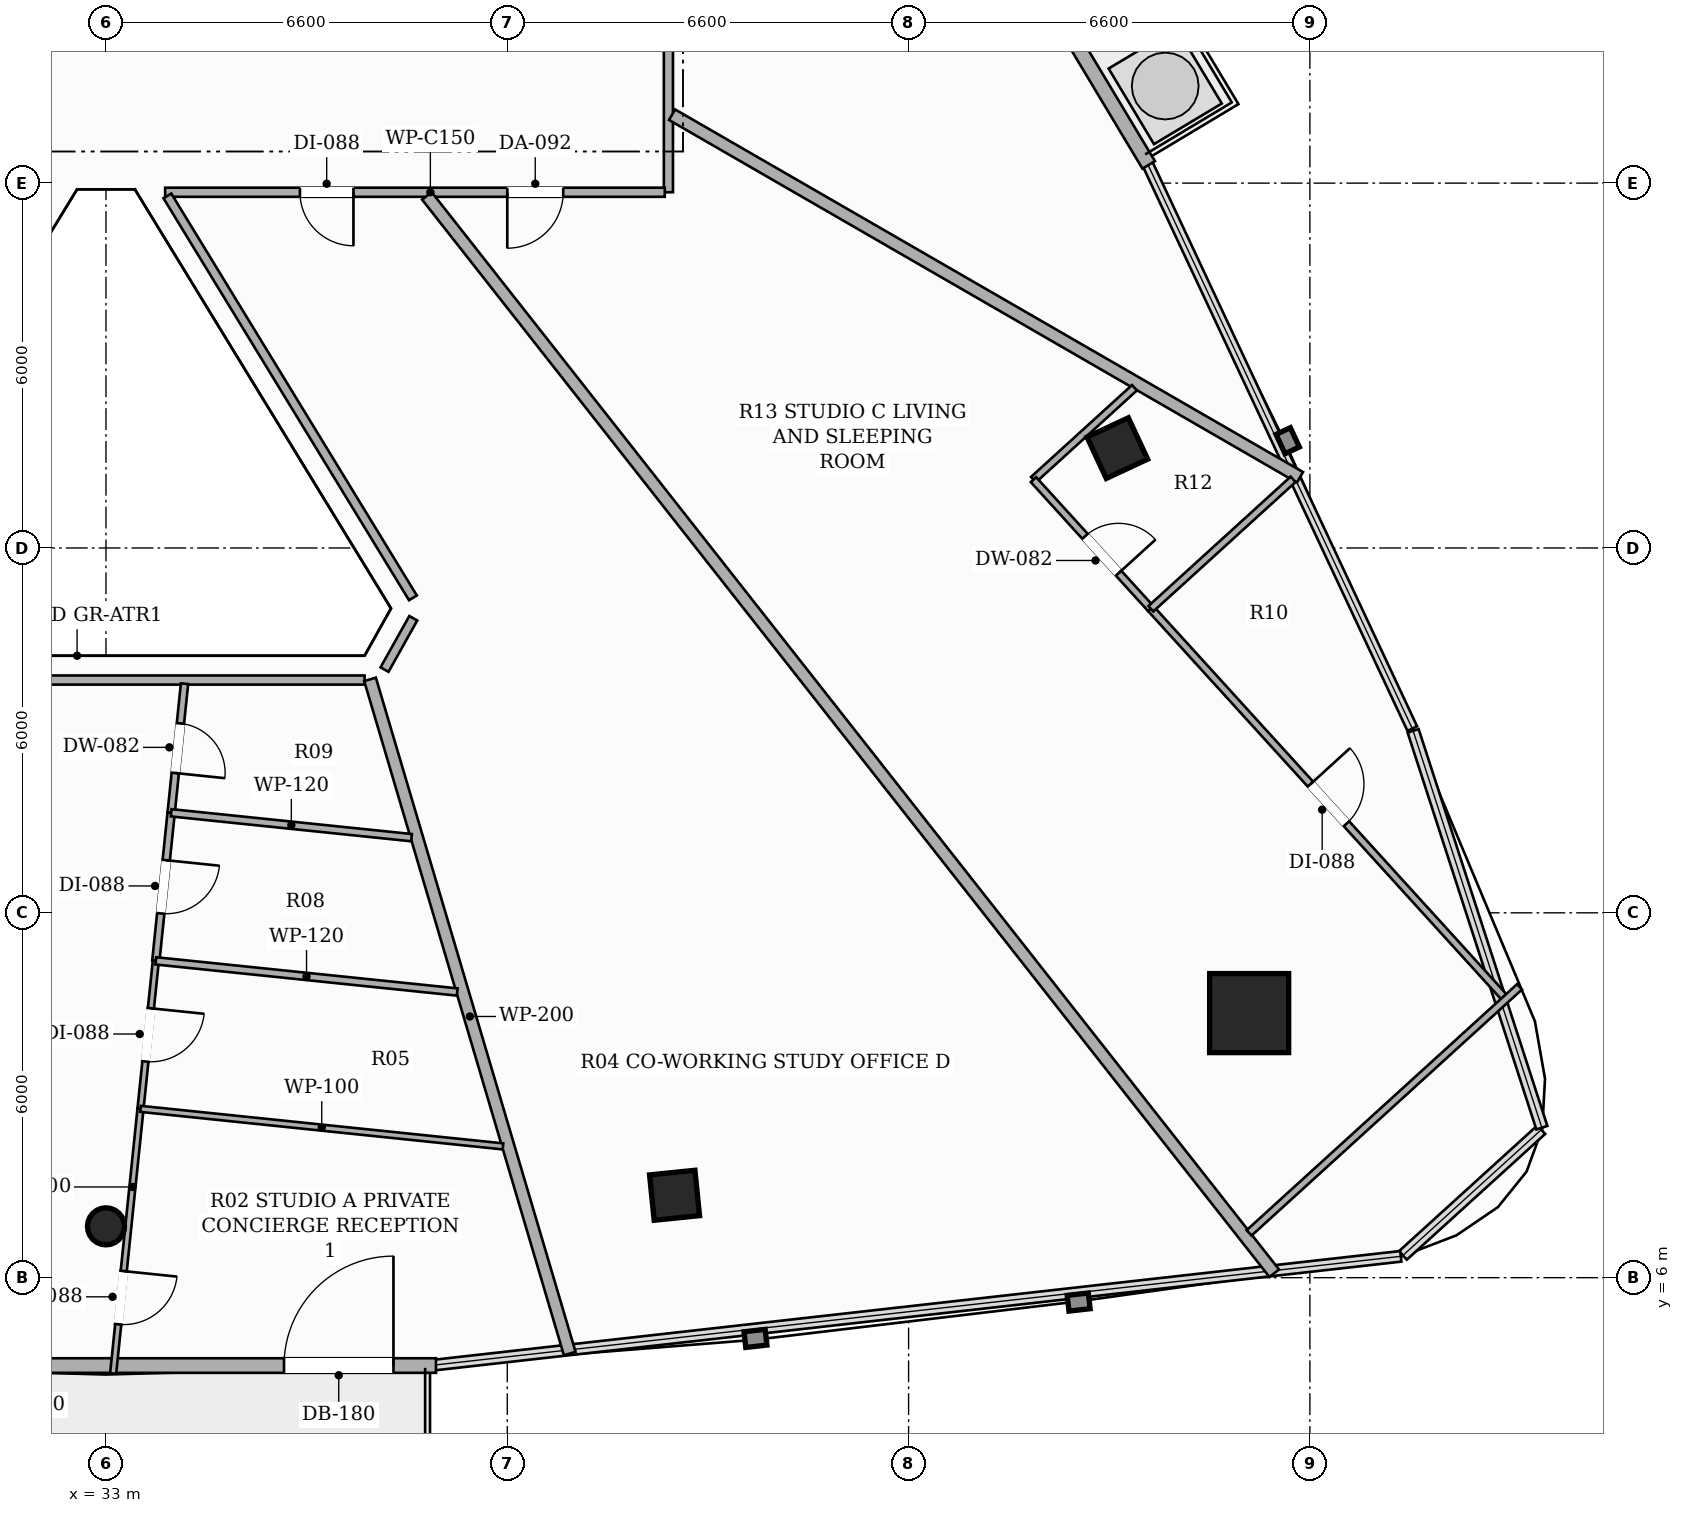
"""IFC4 building model, lengths in metres.
Left out: names, types, materials, properties, quantities, classifications, styles, units other than length and angle.
Written with IfcOpenShell. Run it as: python <this file> out.ifc"""

import sys

from ifc_helpers import new_model, si_unit, direction, frame, frame_2d, origin, origin_2d, place, context, subcontext, project, spatial, rectangle, hollow_rectangle, hollow_circle, extrude, element, fill, save


model = new_model("IFC4")
c1 = context("Model", 3, precision=1e-05, world=origin(), true_north=direction((0.0, 1.0)))
c2 = subcontext(c1, "Body", "Model", "MODEL_VIEW")
j1 = project(units=[si_unit("LENGTHUNIT", "METRE"), si_unit("PLANEANGLEUNIT", "RADIAN")], contexts=[c1])
p1 = place(None, origin())
s1 = spatial("IfcSite", under=j1, at=p1, CompositionType="ELEMENT")
p2 = place(p1, origin())
s2 = spatial("IfcBuilding", under=s1, at=p2, CompositionType="ELEMENT")
p3 = place(p2, frame((0.0, 0.0, 196.4)))
s3 = spatial("IfcBuildingStorey", under=s2, at=p3, CompositionType="ELEMENT", Elevation=196.4)
p4 = place(p3, frame((51.801, 10.351, 0.0), z_axis=(0.0, 0.0, 1.0), x_axis=(1.0, 0.0, 0.0)))
e1 = element("IfcColumn", 1, at=p4, inside=s3, PredefinedType="COLUMN", context=c2, shape_type="SweptSolid", body=[
    extrude(hollow_rectangle(XDim=1.3, YDim=1.3, WallThickness=0.04, at=origin_2d()), origin(), (0.0, 0.0, 1.0), 3.3),
])
p5 = place(p3, frame((33.0, 6.844, 0.0), z_axis=(0.0, 0.0, 1.0), x_axis=(1.0, 0.0, 0.0)))
e2 = element("IfcColumn", 2, at=p5, inside=s3, PredefinedType="COLUMN", context=c2, shape_type="SweptSolid", body=[
    extrude(hollow_circle(Radius=0.305, WallThickness=0.016, at=origin_2d()), origin(), (0.0, 0.0, 1.0), 3.3),
])
for number, where, z_axis, x_axis in (
    (3, (42.351, 7.355, 0.0), (0.0, 0.0, 1.0), (0.995, 0.101, 0.0)),
    (4, (49.633, 19.642, 0.0), (0.0, 0.0, 1.0), (-0.423, 0.906, 0.0)),
):
    element("IfcColumn", number, at=place(p3, frame(where, z_axis=z_axis, x_axis=x_axis)), inside=s3, PredefinedType="COLUMN", context=c2, shape_type="SweptSolid", body=[
        extrude(hollow_rectangle(XDim=0.75, YDim=0.75, WallThickness=0.025, at=origin_2d()), origin(), (0.0, 0.0, 1.0), 3.3),
    ])
p6 = place(p3, frame((27.573, 4.555, 0.0), z_axis=(0.0, 0.0, 1.0), x_axis=(1.0, 0.0, 0.0)))
e5 = element("IfcWall", 5, at=p6, inside=s3, PredefinedType="SOLIDWALL", context=c2, shape_type="SweptSolid", body=[
    extrude(rectangle(XDim=10.854, YDim=0.24, at=frame_2d((5.427, 0.0))), origin(), (0.0, 0.0, 1.0), 2.624),
])
p7 = place(p6, frame((8.355, 0.0, 0.0)))
e6 = element("IfcOpeningElement", 6, at=p7, cuts=e5, PredefinedType="OPENING", context=c2, shape_type="SweptSolid", body=[
    extrude(rectangle(XDim=1.8, YDim=2.2, at=frame_2d((0.9, 1.1))), frame((0.0, 0.13, 0.0), z_axis=(0.0, -1.0, 0.0), x_axis=(1.0, 0.0, 0.0)), (0.0, 0.0, 1.0), 0.26),
])
p8 = place(p3, frame((50.149, 24.3, 0.0), z_axis=(0.0, 0.0, 1.0), x_axis=(-0.514406779101, 0.857546305231, 0.0)))
e7 = element("IfcWall", 7, at=p8, inside=s3, PredefinedType="SOLIDWALL", context=c2, shape_type="SweptSolid", body=[
    extrude(rectangle(XDim=10.492, YDim=0.24, at=frame_2d((5.246, 0.0))), origin(), (0.0, 0.0, 1.0), 2.624),
])
p9 = place(p8, frame((7.994, 0.0, 0.0)))
e8 = element("IfcOpeningElement", 8, at=p9, cuts=e7, PredefinedType="OPENING", context=c2, shape_type="SweptSolid", body=[
    extrude(rectangle(XDim=1.8, YDim=2.2, at=frame_2d((0.9, 1.1))), frame((0.0, 0.13, 0.0), z_axis=(0.0, -1.0, 0.0), x_axis=(1.0, 0.0, 0.0)), (0.0, 0.0, 1.0), 0.26),
])
p10 = place(p3, frame((42.25, 26.59, 0.0), z_axis=(0.0, 0.0, 1.0), x_axis=(0.0, -1.0, 0.0)))
e9 = element("IfcWall", 9, at=p10, inside=s3, PredefinedType="PARTITIONING", context=c2, shape_type="SweptSolid", body=[
    extrude(rectangle(XDim=2.74, YDim=0.15, at=frame_2d((1.37, 0.0))), origin(), (0.0, 0.0, 1.0), 2.773),
])
p11 = place(p3, frame((42.19, 23.85, 0.0), z_axis=(0.0, 0.0, 1.0), x_axis=(-1.0, 0.0, 0.0)))
e10 = element("IfcWall", 10, at=p11, inside=s3, PredefinedType="PARTITIONING", context=c2, shape_type="SweptSolid", body=[
    extrude(rectangle(XDim=8.217, YDim=0.15, at=frame_2d((4.108, 0.0))), origin(), (0.0, 0.0, 1.0), 2.565),
])
p12 = place(p11, frame((1.67, 0.0, 0.0)))
e11 = element("IfcOpeningElement", 11, at=p12, cuts=e10, PredefinedType="OPENING", context=c2, shape_type="SweptSolid", body=[
    extrude(rectangle(XDim=0.92, YDim=2.15, at=frame_2d((0.46, 1.075))), frame((0.0, 0.085, 0.0), z_axis=(0.0, -1.0, 0.0), x_axis=(1.0, 0.0, 0.0)), (0.0, 0.0, 1.0), 0.17),
])
p13 = place(p11, frame((5.12, 0.0, 0.0)))
e12 = element("IfcOpeningElement", 12, at=p13, cuts=e10, PredefinedType="OPENING", context=c2, shape_type="SweptSolid", body=[
    extrude(rectangle(XDim=0.88, YDim=2.1, at=frame_2d((0.44, 1.05))), frame((0.0, 0.085, 0.0), z_axis=(0.0, -1.0, 0.0), x_axis=(1.0, 0.0, 0.0)), (0.0, 0.0, 1.0), 0.17),
])
p14 = place(p3, frame((34.01, 23.79, 0.0), z_axis=(0.0, 0.0, 1.0), x_axis=(0.521316137909, -0.853363629618, 0.0)))
e13 = element("IfcWall", 13, at=p14, inside=s3, PredefinedType="PARTITIONING", context=c2, shape_type="SweptSolid", body=[
    extrude(rectangle(XDim=7.746, YDim=0.15, at=frame_2d((3.873, 0.0))), origin(), (0.0, 0.0, 1.0), 2.773),
])
p15 = place(p3, frame((38.054, 16.844, 0.0), z_axis=(0.0, 0.0, 1.0), x_axis=(-0.488810833005, -0.872389803664, 0.0)))
e14 = element("IfcWall", 14, at=p15, inside=s3, PredefinedType="PARTITIONING", context=c2, shape_type="SweptSolid", body=[
    extrude(rectangle(XDim=0.968, YDim=0.15, at=frame_2d((0.484, 0.0))), origin(), (0.0, 0.0, 1.0), 3.06),
])
p16 = place(p3, frame((37.253, 15.828, 0.0), z_axis=(0.0, 0.0, 1.0), x_axis=(-1.0, 0.0, 0.0)))
e15 = element("IfcWall", 15, at=p16, inside=s3, PredefinedType="PARTITIONING", context=c2, shape_type="SweptSolid", body=[
    extrude(rectangle(XDim=8.506, YDim=0.15, at=frame_2d((4.253, 0.0))), origin(), (0.0, 0.0, 1.0), 2.773),
])
p17 = place(p3, frame((37.343, 15.839, 0.0), z_axis=(0.0, 0.0, 1.0), x_axis=(0.28399703203, -0.958825159139, 0.0)))
e16 = element("IfcWall", 16, at=p17, inside=s3, PredefinedType="PARTITIONING", context=c2, shape_type="SweptSolid", body=[
    extrude(rectangle(XDim=11.563, YDim=0.2, at=frame_2d((5.782, 0.0))), origin(), (0.0, 0.0, 1.0), 2.492),
])
p18 = place(p3, frame((52.214, 6.073, 0.0), z_axis=(0.0, 0.0, 1.0), x_axis=(-0.618246700658, 0.785984107425, 0.0)))
e17 = element("IfcWall", 17, at=p18, inside=s3, PredefinedType="PARTITIONING", context=c2, shape_type="SweptSolid", body=[
    extrude(rectangle(XDim=22.541, YDim=0.2, at=frame_2d((11.271, 0.0))), origin(), (0.0, 0.0, 1.0), 2.492),
])
p19 = place(p3, frame((42.31, 25.125, 0.0), z_axis=(0.0, 0.0, 1.0), x_axis=(0.866001812803, -0.500040858552, 0.0)))
e18 = element("IfcWall", 18, at=p19, inside=s3, PredefinedType="PARTITIONING", context=c2, shape_type="SweptSolid", body=[
    extrude(rectangle(XDim=11.925, YDim=0.2, at=frame_2d((5.962, 0.0))), origin(), (0.0, 0.0, 1.0), 2.492),
])
p20 = place(p3, frame((34.292, 15.768, 0.0), z_axis=(0.0, 0.0, 1.0), x_axis=(-0.103059151492, -0.994675229054, 0.0)))
e19 = element("IfcWall", 19, at=p20, inside=s3, PredefinedType="PARTITIONING", context=c2, shape_type="SweptSolid", body=[
    extrude(rectangle(XDim=2.135, YDim=0.12, at=frame_2d((1.067, 0.0))), origin(), (0.0, 0.0, 1.0), 3.06),
])
p21 = place(p20, frame((0.657, 0.0, 0.0)))
e20 = element("IfcOpeningElement", 20, at=p21, cuts=e19, PredefinedType="OPENING", context=c2, shape_type="SweptSolid", body=[
    extrude(rectangle(XDim=0.82, YDim=2.1, at=frame_2d((0.41, 1.05))), frame((0.0, 0.07, 0.0), z_axis=(0.0, -1.0, 0.0), x_axis=(1.0, 0.0, 0.0)), (0.0, 0.0, 1.0), 0.14),
])
p22 = place(p3, frame((34.072, 13.645, 0.0), z_axis=(0.0, 0.0, 1.0), x_axis=(-0.102919566026, -0.994689681724, 0.0)))
e21 = element("IfcWall", 21, at=p22, inside=s3, PredefinedType="PARTITIONING", context=c2, shape_type="SweptSolid", body=[
    extrude(rectangle(XDim=2.448, YDim=0.12, at=frame_2d((1.224, 0.0))), origin(), (0.0, 0.0, 1.0), 3.06),
])
p23 = place(p22, frame((0.784, 0.0, 0.0)))
e22 = element("IfcOpeningElement", 22, at=p23, cuts=e21, PredefinedType="OPENING", context=c2, shape_type="SweptSolid", body=[
    extrude(rectangle(XDim=0.88, YDim=2.1, at=frame_2d((0.44, 1.05))), frame((0.0, 0.07, 0.0), z_axis=(0.0, -1.0, 0.0), x_axis=(1.0, 0.0, 0.0)), (0.0, 0.0, 1.0), 0.14),
])
p24 = place(p3, frame((33.568, 8.776, 0.0), z_axis=(0.0, 0.0, 1.0), x_axis=(-0.1029239069, -0.994689232569, 0.0)))
e23 = element("IfcWall", 23, at=p24, inside=s3, PredefinedType="PARTITIONING", context=c2, shape_type="SweptSolid", body=[
    extrude(rectangle(XDim=4.374, YDim=0.1, at=frame_2d((2.187, 0.0))), origin(), (0.0, 0.0, 1.0), 2.492),
])
p25 = place(p24, frame((2.682, 0.0, 0.0)))
e24 = element("IfcOpeningElement", 24, at=p25, cuts=e23, PredefinedType="OPENING", context=c2, shape_type="SweptSolid", body=[
    extrude(rectangle(XDim=0.88, YDim=2.1, at=frame_2d((0.44, 1.05))), frame((0.0, 0.06, 0.0), z_axis=(0.0, -1.0, 0.0), x_axis=(1.0, 0.0, 0.0)), (0.0, 0.0, 1.0), 0.12),
])
p26 = place(p3, frame((33.82, 11.21, 0.0), z_axis=(0.0, 0.0, 1.0), x_axis=(-0.102960420087, -0.994685453747, 0.0)))
e25 = element("IfcWall", 25, at=p26, inside=s3, PredefinedType="PARTITIONING", context=c2, shape_type="SweptSolid", body=[
    extrude(rectangle(XDim=2.447, YDim=0.1, at=frame_2d((1.224, 0.0))), origin(), (0.0, 0.0, 1.0), 3.06),
])
p27 = place(p26, frame((0.784, 0.0, 0.0)))
e26 = element("IfcOpeningElement", 26, at=p27, cuts=e25, PredefinedType="OPENING", context=c2, shape_type="SweptSolid", body=[
    extrude(rectangle(XDim=0.88, YDim=2.1, at=frame_2d((0.44, 1.05))), frame((0.0, 0.06, 0.0), z_axis=(0.0, -1.0, 0.0), x_axis=(1.0, 0.0, 0.0)), (0.0, 0.0, 1.0), 0.12),
])
p28 = place(p3, frame((38.025, 13.236, 0.0), z_axis=(0.0, 0.0, 1.0), x_axis=(-0.99469136016, 0.102903343108, 0.0)))
e27 = element("IfcWall", 27, at=p28, inside=s3, PredefinedType="PARTITIONING", context=c2, shape_type="SweptSolid", body=[
    extrude(rectangle(XDim=3.974, YDim=0.12, at=frame_2d((1.987, 0.0))), origin(), (0.0, 0.0, 1.0), 2.773),
])
p29 = place(p3, frame((38.777, 10.698, 0.0), z_axis=(0.0, 0.0, 1.0), x_axis=(-0.994708898019, 0.102733676081, 0.0)))
e28 = element("IfcWall", 28, at=p29, inside=s3, PredefinedType="PARTITIONING", context=c2, shape_type="SweptSolid", body=[
    extrude(rectangle(XDim=4.983, YDim=0.12, at=frame_2d((2.492, 0.0))), origin(), (0.0, 0.0, 1.0), 2.773),
])
p30 = place(p3, frame((33.568, 8.776, 0.0), z_axis=(0.0, 0.0, 1.0), x_axis=(0.994686760155, -0.102947798284, 0.0)))
e29 = element("IfcWall", 29, at=p30, inside=s3, PredefinedType="PARTITIONING", context=c2, shape_type="SweptSolid", body=[
    extrude(rectangle(XDim=5.993, YDim=0.1, at=frame_2d((2.996, 0.0))), origin(), (0.0, 0.0, 1.0), 2.773),
])
p31 = place(p3, frame((49.915, 20.635, 0.0), z_axis=(0.0, 0.0, 1.0), x_axis=(-0.739748179987, -0.672883816276, 0.0)))
e30 = element("IfcWall", 30, at=p31, inside=s3, PredefinedType="PARTITIONING", context=c2, shape_type="SweptSolid", body=[
    extrude(rectangle(XDim=2.246, YDim=0.12, at=frame_2d((1.123, 0.0))), origin(), (0.0, 0.0, 1.0), 2.492),
])
p32 = place(p3, frame((48.254, 19.124, 0.0), z_axis=(0.0, 0.0, 1.0), x_axis=(0.672884473084, -0.739747582546, 0.0)))
e31 = element("IfcWall", 31, at=p32, inside=s3, PredefinedType="PARTITIONING", context=c2, shape_type="SweptSolid", body=[
    extrude(rectangle(XDim=2.87, YDim=0.12, at=frame_2d((1.435, 0.0))), origin(), (0.0, 0.0, 1.0), 2.492),
])
p33 = place(p32, frame((1.26, 0.0, 0.0)))
e32 = element("IfcOpeningElement", 32, at=p33, cuts=e31, PredefinedType="OPENING", context=c2, shape_type="SweptSolid", body=[
    extrude(rectangle(XDim=0.82, YDim=2.1, at=frame_2d((0.41, 1.05))), frame((0.0, 0.07, 0.0), z_axis=(0.0, -1.0, 0.0), x_axis=(1.0, 0.0, 0.0)), (0.0, 0.0, 1.0), 0.14),
])
p34 = place(p3, frame((50.185, 17.001, 0.0), z_axis=(0.0, 0.0, 1.0), x_axis=(0.672902356661, -0.739731315005, 0.0)))
e33 = element("IfcWall", 33, at=p34, inside=s3, PredefinedType="PARTITIONING", context=c2, shape_type="SweptSolid", body=[
    extrude(rectangle(XDim=8.68, YDim=0.12, at=frame_2d((4.34, 0.0))), origin(), (0.0, 0.0, 1.0), 2.492),
])
p35 = place(p34, frame((3.9, 0.0, 0.0)))
e34 = element("IfcOpeningElement", 34, at=p35, cuts=e33, PredefinedType="OPENING", context=c2, shape_type="SweptSolid", body=[
    extrude(rectangle(XDim=0.88, YDim=2.1, at=frame_2d((0.44, 1.05))), frame((0.0, 0.07, 0.0), z_axis=(0.0, -1.0, 0.0), x_axis=(1.0, 0.0, 0.0)), (0.0, 0.0, 1.0), 0.14),
])
p36 = place(p3, frame((56.248, 10.783, 0.0), z_axis=(0.0, 0.0, 1.0), x_axis=(-0.739671804489, -0.672967771624, 0.0)))
e35 = element("IfcWall", 35, at=p36, inside=s3, PredefinedType="PARTITIONING", context=c2, shape_type="SweptSolid", body=[
    extrude(rectangle(XDim=6.013, YDim=0.12, at=frame_2d((3.007, 0.0))), origin(), (0.0, 0.0, 1.0), 3.06),
])
p37 = place(p3, frame((52.524, 19.129, 0.0), z_axis=(0.0, 0.0, 1.0), x_axis=(-0.739674496232, -0.672964813065, 0.0)))
e36 = element("IfcWall", 36, at=p37, inside=s3, PredefinedType="PARTITIONING", context=c2, shape_type="SweptSolid", body=[
    extrude(rectangle(XDim=3.162, YDim=0.12, at=frame_2d((1.581, 0.0))), origin(), (0.0, 0.0, 1.0), 2.492),
])
p38 = place(p7, origin())
e37 = element("IfcDoor", 37, at=p38, inside=s3, OperationType="SINGLE_SWING_RIGHT", PredefinedType="DOOR", context=c2, shape_type="SweptSolid", body=[
    extrude(rectangle(XDim=1.8, YDim=2.2, at=frame_2d((0.9, 1.1))), frame((0.0, 0.025, 0.0), z_axis=(0.0, -1.0, 0.0), x_axis=(1.0, 0.0, 0.0)), (0.0, 0.0, 1.0), 0.05),
])
fill(e6, e37)
p39 = place(p21, origin())
e38 = element("IfcDoor", 38, at=p39, inside=s3, OperationType="SINGLE_SWING_RIGHT", PredefinedType="DOOR", context=c2, shape_type="SweptSolid", body=[
    extrude(rectangle(XDim=0.82, YDim=2.1, at=frame_2d((0.41, 1.05))), frame((0.0, 0.025, 0.0), z_axis=(0.0, -1.0, 0.0), x_axis=(1.0, 0.0, 0.0)), (0.0, 0.0, 1.0), 0.05),
])
fill(e20, e38)
p40 = place(p23, origin())
e39 = element("IfcDoor", 39, at=p40, inside=s3, OperationType="SINGLE_SWING_LEFT", PredefinedType="DOOR", context=c2, shape_type="SweptSolid", body=[
    extrude(rectangle(XDim=0.88, YDim=2.1, at=frame_2d((0.44, 1.05))), frame((0.0, 0.025, 0.0), z_axis=(0.0, -1.0, 0.0), x_axis=(1.0, 0.0, 0.0)), (0.0, 0.0, 1.0), 0.05),
])
fill(e22, e39)
p41 = place(p25, origin())
e40 = element("IfcDoor", 40, at=p41, inside=s3, OperationType="SINGLE_SWING_LEFT", PredefinedType="DOOR", context=c2, shape_type="SweptSolid", body=[
    extrude(rectangle(XDim=0.88, YDim=2.1, at=frame_2d((0.44, 1.05))), frame((0.0, 0.025, 0.0), z_axis=(0.0, -1.0, 0.0), x_axis=(1.0, 0.0, 0.0)), (0.0, 0.0, 1.0), 0.05),
])
fill(e24, e40)
p42 = place(p27, origin())
e41 = element("IfcDoor", 41, at=p42, inside=s3, OperationType="SINGLE_SWING_LEFT", PredefinedType="DOOR", context=c2, shape_type="SweptSolid", body=[
    extrude(rectangle(XDim=0.88, YDim=2.1, at=frame_2d((0.44, 1.05))), frame((0.0, 0.025, 0.0), z_axis=(0.0, -1.0, 0.0), x_axis=(1.0, 0.0, 0.0)), (0.0, 0.0, 1.0), 0.05),
])
fill(e26, e41)
p43 = place(p12, origin())
e42 = element("IfcDoor", 42, at=p43, inside=s3, OperationType="SINGLE_SWING_RIGHT", PredefinedType="DOOR", context=c2, shape_type="SweptSolid", body=[
    extrude(rectangle(XDim=0.92, YDim=2.15, at=frame_2d((0.46, 1.075))), frame((0.0, 0.025, 0.0), z_axis=(0.0, -1.0, 0.0), x_axis=(1.0, 0.0, 0.0)), (0.0, 0.0, 1.0), 0.05),
])
fill(e11, e42)
p44 = place(p33, origin())
e43 = element("IfcDoor", 43, at=p44, inside=s3, OperationType="SINGLE_SWING_RIGHT", PredefinedType="DOOR", context=c2, shape_type="SweptSolid", body=[
    extrude(rectangle(XDim=0.82, YDim=2.1, at=frame_2d((0.41, 1.05))), frame((0.0, 0.025, 0.0), z_axis=(0.0, -1.0, 0.0), x_axis=(1.0, 0.0, 0.0)), (0.0, 0.0, 1.0), 0.05),
])
fill(e32, e43)
p45 = place(p35, origin())
e44 = element("IfcDoor", 44, at=p45, inside=s3, OperationType="SINGLE_SWING_LEFT", PredefinedType="DOOR", context=c2, shape_type="SweptSolid", body=[
    extrude(rectangle(XDim=0.88, YDim=2.1, at=frame_2d((0.44, 1.05))), frame((0.0, 0.025, 0.0), z_axis=(0.0, -1.0, 0.0), x_axis=(1.0, 0.0, 0.0)), (0.0, 0.0, 1.0), 0.05),
])
fill(e34, e44)
p46 = place(p13, origin())
e45 = element("IfcDoor", 45, at=p46, inside=s3, OperationType="SINGLE_SWING_LEFT", PredefinedType="DOOR", context=c2, shape_type="SweptSolid", body=[
    extrude(rectangle(XDim=0.88, YDim=2.1, at=frame_2d((0.44, 1.05))), frame((0.0, 0.025, 0.0), z_axis=(0.0, -1.0, 0.0), x_axis=(1.0, 0.0, 0.0)), (0.0, 0.0, 1.0), 0.05),
])
fill(e12, e45)
save(model, sys.argv[1])
